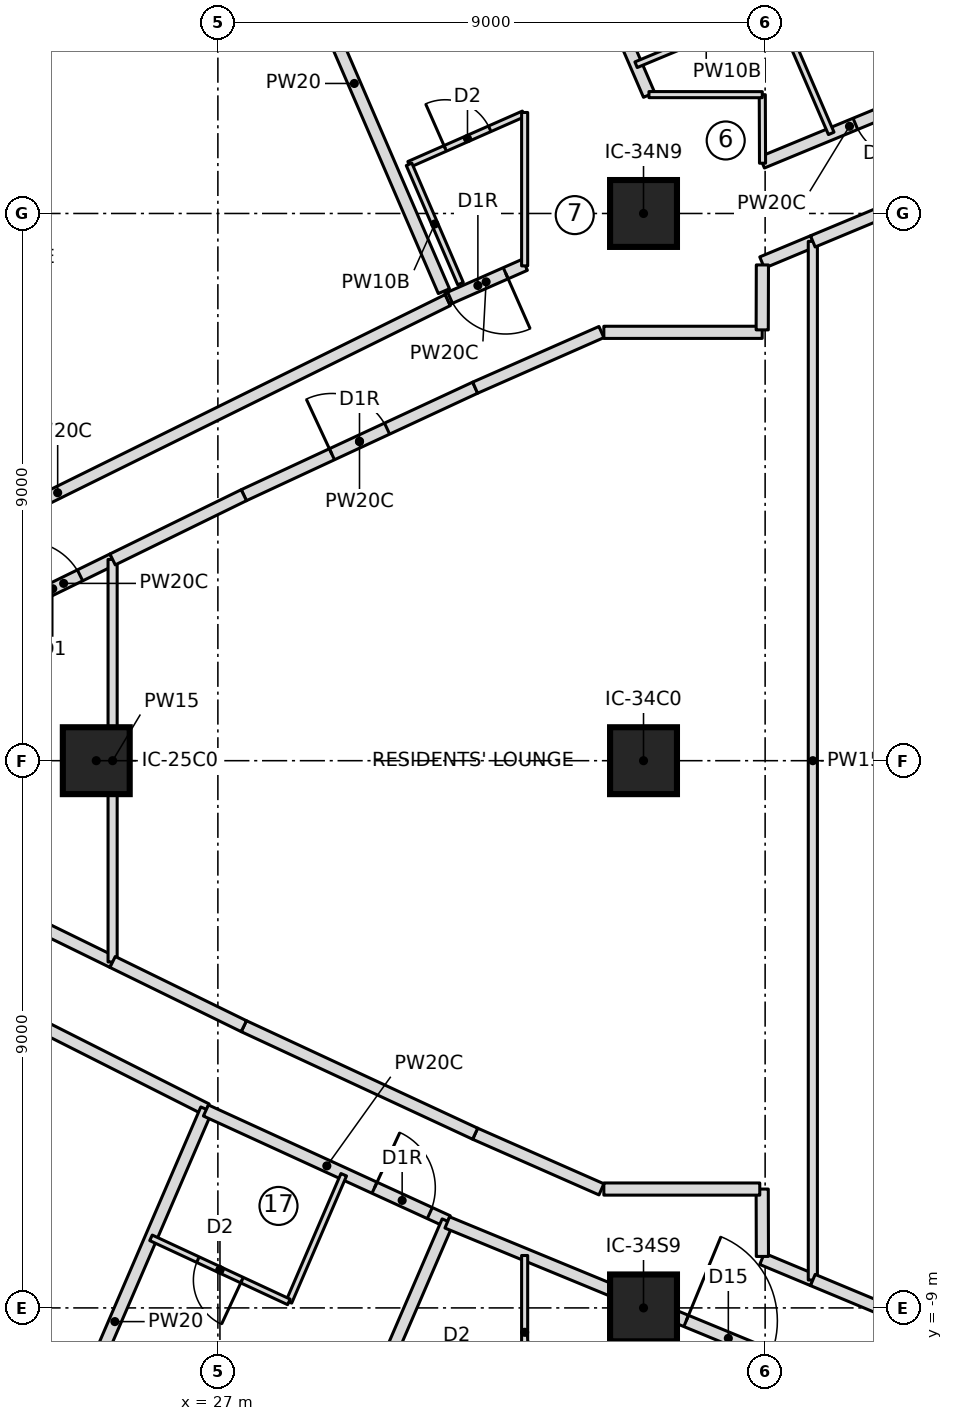
"""IFC4 building model, lengths in metres.
Left out: names, types, materials, properties, quantities, classifications, styles, units other than length and angle.
Written with IfcOpenShell. Run it as: python <this file> out.ifc"""

import sys

from ifc_helpers import new_model, si_unit, direction, frame, frame_2d, origin, origin_2d, place, context, subcontext, project, spatial, rectangle, extrude, element, fill, save


model = new_model("IFC4")
c1 = context("Model", 3, precision=1e-05, world=origin(), true_north=direction((0.0, 1.0)))
c2 = subcontext(c1, "Body", "Model", "MODEL_VIEW")
j1 = project(units=[si_unit("LENGTHUNIT", "METRE"), si_unit("PLANEANGLEUNIT", "RADIAN")], contexts=[c1])
p1 = place(None, origin())
s1 = spatial("IfcSite", under=j1, at=p1, CompositionType="ELEMENT")
p2 = place(p1, origin())
s2 = spatial("IfcBuilding", under=s1, at=p2, CompositionType="ELEMENT")
p3 = place(p2, frame((0.0, 0.0, 133.75)))
s3 = spatial("IfcBuildingStorey", under=s2, at=p3, CompositionType="ELEMENT", Elevation=133.75)
for number, where, z_axis, x_axis in (
    (1, (25.0, 0.0, 0.0), (0.0, 0.0, 1.0), (1.0, 0.0, 0.0)),
    (2, (34.0, -9.0, 0.0), (0.0, 0.0, 1.0), (1.0, 0.0, 0.0)),
    (3, (34.0, 0.0, 0.0), (0.0, 0.0, 1.0), (1.0, 0.0, 0.0)),
    (4, (34.0, 9.0, 0.0), (0.0, 0.0, 1.0), (1.0, 0.0, 0.0)),
):
    element("IfcColumn", number, at=place(p3, frame(where, z_axis=z_axis, x_axis=x_axis)), inside=s3, PredefinedType="COLUMN", context=c2, shape_type="SweptSolid", body=[
        extrude(rectangle(XDim=1.1, YDim=1.1, at=origin_2d()), origin(), (0.0, 0.0, 1.0), 3.55),
    ])
p4 = place(p3, frame((17.95, 1.238, 0.0), z_axis=(0.0, 0.0, 1.0), x_axis=(0.896593504408, 0.44285447706, 0.0)))
e5 = element("IfcWall", 5, at=p4, inside=s3, PredefinedType="PARTITIONING", context=c2, shape_type="SweptSolid", body=[
    extrude(rectangle(XDim=14.31, YDim=0.2, at=frame_2d((7.155, 0.0))), origin(), (0.0, 0.0, 1.0), 3.25),
])
p5 = place(p4, frame((3.05, 0.0, 0.0)))
e6 = element("IfcOpeningElement", 6, at=p5, cuts=e5, PredefinedType="OPENING", context=c2, shape_type="SweptSolid", body=[
    extrude(rectangle(XDim=1.5, YDim=2.1, at=frame_2d((0.75, 1.05))), frame((0.0, 0.11, 0.0), z_axis=(0.0, -1.0, 0.0), x_axis=(1.0, 0.0, 0.0)), (0.0, 0.0, 1.0), 0.22),
])
p6 = place(p3, frame((30.717, 7.722, 0.0), z_axis=(0.0, 0.0, 1.0), x_axis=(-0.395993466394, 0.918253328104, 0.0)))
e7 = element("IfcWall", 7, at=p6, inside=s3, PredefinedType="PARTITIONING", context=c2, shape_type="SweptSolid", body=[
    extrude(rectangle(XDim=7.44, YDim=0.2, at=frame_2d((3.72, 0.0))), origin(), (0.0, 0.0, 1.0), 3.25),
])
p7 = place(p3, frame((32.05, 8.157, 0.0), z_axis=(0.0, 0.0, 1.0), x_axis=(-0.915155082005, -0.403101942293, 0.0)))
e8 = element("IfcWall", 8, at=p7, inside=s3, PredefinedType="PARTITIONING", context=c2, shape_type="SweptSolid", body=[
    extrude(rectangle(XDim=1.396, YDim=0.2, at=frame_2d((0.698, 0.0))), origin(), (0.0, 0.0, 1.0), 3.25),
])
p8 = place(p7, frame((0.346, 0.0, 0.0)))
e9 = element("IfcOpeningElement", 9, at=p8, cuts=e8, PredefinedType="OPENING", context=c2, shape_type="SweptSolid", body=[
    extrude(rectangle(XDim=1.0, YDim=2.1, at=frame_2d((0.5, 1.05))), frame((0.0, 0.11, 0.0), z_axis=(0.0, -1.0, 0.0), x_axis=(1.0, 0.0, 0.0)), (0.0, 0.0, 1.0), 0.22),
])
p9 = place(p3, frame((30.144, 9.809, 0.0), z_axis=(0.0, 0.0, 1.0), x_axis=(0.915122534717, 0.40317582573, 0.0)))
e10 = element("IfcWall", 10, at=p9, inside=s3, PredefinedType="PARTITIONING", context=c2, shape_type="SweptSolid", body=[
    extrude(rectangle(XDim=2.058, YDim=0.1, at=frame_2d((1.029, 0.0))), origin(), (0.0, 0.0, 1.0), 3.25),
])
p10 = place(p9, frame((0.65, 0.0, 0.0)))
e11 = element("IfcOpeningElement", 11, at=p10, cuts=e10, PredefinedType="OPENING", context=c2, shape_type="SweptSolid", body=[
    extrude(rectangle(XDim=0.8, YDim=2.1, at=frame_2d((0.4, 1.05))), frame((0.0, 0.06, 0.0), z_axis=(0.0, -1.0, 0.0), x_axis=(1.0, 0.0, 0.0)), (0.0, 0.0, 1.0), 0.12),
])
p11 = place(p3, frame((30.99, 7.846, 0.0), z_axis=(0.0, 0.0, 1.0), x_axis=(-0.396055229638, 0.918226690462, 0.0)))
e12 = element("IfcWall", 12, at=p11, inside=s3, PredefinedType="PARTITIONING", context=c2, shape_type="SweptSolid", body=[
    extrude(rectangle(XDim=2.137, YDim=0.1, at=frame_2d((1.069, 0.0))), origin(), (0.0, 0.0, 1.0), 3.25),
])
p12 = place(p3, frame((34.092, 10.95, 0.0), z_axis=(0.0, 0.0, 1.0), x_axis=(-0.395991607501, 0.918254129742, 0.0)))
e13 = element("IfcWall", 13, at=p12, inside=s3, PredefinedType="PARTITIONING", context=c2, shape_type="SweptSolid", body=[
    extrude(rectangle(XDim=5.841, YDim=0.2, at=frame_2d((2.92, 0.0))), origin(), (0.0, 0.0, 1.0), 3.25),
])
p13 = place(p3, frame((38.824, 11.028, 0.0), z_axis=(0.0, 0.0, 1.0), x_axis=(-0.924238544028, -0.381815549359, 0.0)))
e14 = element("IfcWall", 14, at=p13, inside=s3, PredefinedType="PARTITIONING", context=c2, shape_type="SweptSolid", body=[
    extrude(rectangle(XDim=3.11, YDim=0.2, at=frame_2d((1.555, 0.0))), origin(), (0.0, 0.0, 1.0), 3.25),
])
p14 = place(p13, frame((0.45, 0.0, 0.0)))
e15 = element("IfcOpeningElement", 15, at=p14, cuts=e14, PredefinedType="OPENING", context=c2, shape_type="SweptSolid", body=[
    extrude(rectangle(XDim=1.0, YDim=2.1, at=frame_2d((0.5, 1.05))), frame((0.0, 0.11, 0.0), z_axis=(0.0, -1.0, 0.0), x_axis=(1.0, 0.0, 0.0)), (0.0, 0.0, 1.0), 0.22),
])
p15 = place(p3, frame((33.877, 11.446, 0.0), z_axis=(0.0, 0.0, 1.0), x_axis=(0.923033583854, 0.384719382248, 0.0)))
e16 = element("IfcWall", 16, at=p15, inside=s3, PredefinedType="PARTITIONING", context=c2, shape_type="SweptSolid", body=[
    extrude(rectangle(XDim=2.5, YDim=0.1, at=frame_2d((1.25, 0.0))), origin(), (0.0, 0.0, 1.0), 3.25),
])
p16 = place(p15, frame((1.15, 0.0, 0.0)))
e17 = element("IfcOpeningElement", 17, at=p16, cuts=e16, PredefinedType="OPENING", context=c2, shape_type="SweptSolid", body=[
    extrude(rectangle(XDim=0.8, YDim=2.1, at=frame_2d((0.4, 1.05))), frame((0.0, 0.06, 0.0), z_axis=(0.0, -1.0, 0.0), x_axis=(1.0, 0.0, 0.0)), (0.0, 0.0, 1.0), 0.12),
])
p17 = place(p3, frame((36.185, 12.408, 0.0), z_axis=(0.0, 0.0, 1.0), x_axis=(0.395936907069, -0.918277717045, 0.0)))
e18 = element("IfcWall", 18, at=p17, inside=s3, PredefinedType="PARTITIONING", context=c2, shape_type="SweptSolid", body=[
    extrude(rectangle(XDim=2.277, YDim=0.1, at=frame_2d((1.139, 0.0))), origin(), (0.0, 0.0, 1.0), 3.25),
])
p18 = place(p3, frame((38.832, 11.009, 0.0), z_axis=(0.0, 0.0, 1.0), x_axis=(-0.395987603644, 0.918255856371, 0.0)))
e19 = element("IfcWall", 19, at=p18, inside=s3, PredefinedType="PARTITIONING", context=c2, shape_type="SweptSolid", body=[
    extrude(rectangle(XDim=7.604, YDim=0.2, at=frame_2d((3.802, 0.0))), origin(), (0.0, 0.0, 1.0), 3.25),
])
p19 = place(p3, frame((17.95, -1.261, 0.0), z_axis=(0.0, 0.0, 1.0), x_axis=(0.892679126003, -0.450692775623, 0.0)))
e20 = element("IfcWall", 20, at=p19, inside=s3, PredefinedType="PARTITIONING", context=c2, shape_type="SweptSolid", body=[
    extrude(rectangle(XDim=9.927, YDim=0.2, at=frame_2d((4.963, 0.0))), origin(), (0.0, 0.0, 1.0), 3.25),
])
p20 = place(p19, frame((3.05, 0.0, 0.0)))
e21 = element("IfcOpeningElement", 21, at=p20, cuts=e20, PredefinedType="OPENING", context=c2, shape_type="SweptSolid", body=[
    extrude(rectangle(XDim=1.5, YDim=2.1, at=frame_2d((0.75, 1.05))), frame((0.0, 0.11, 0.0), z_axis=(0.0, -1.0, 0.0), x_axis=(1.0, 0.0, 0.0)), (0.0, 0.0, 1.0), 0.22),
])
p21 = place(p3, frame((23.801, -12.716, 0.0), z_axis=(0.0, 0.0, 1.0), x_axis=(0.395995556294, 0.918252426839, 0.0)))
e22 = element("IfcWall", 22, at=p21, inside=s3, PredefinedType="PARTITIONING", context=c2, shape_type="SweptSolid", body=[
    extrude(rectangle(XDim=7.603, YDim=0.2, at=frame_2d((3.802, 0.0))), origin(), (0.0, 0.0, 1.0), 3.25),
])
p22 = place(p3, frame((26.803, -5.753, 0.0), z_axis=(0.0, 0.0, 1.0), x_axis=(0.90910092787, -0.416575926987, 0.0)))
e23 = element("IfcWall", 23, at=p22, inside=s3, PredefinedType="PARTITIONING", context=c2, shape_type="SweptSolid", body=[
    extrude(rectangle(XDim=4.375, YDim=0.2, at=frame_2d((2.188, 0.0))), origin(), (0.0, 0.0, 1.0), 3.25),
])
p23 = place(p22, frame((3.05, 0.0, 0.0)))
e24 = element("IfcOpeningElement", 24, at=p23, cuts=e23, PredefinedType="OPENING", context=c2, shape_type="SweptSolid", body=[
    extrude(rectangle(XDim=1.0, YDim=2.1, at=frame_2d((0.5, 1.05))), frame((0.0, 0.11, 0.0), z_axis=(0.0, -1.0, 0.0), x_axis=(1.0, 0.0, 0.0)), (0.0, 0.0, 1.0), 0.22),
])
p24 = place(p3, frame((29.07, -6.81, 0.0), z_axis=(0.0, 0.0, 1.0), x_axis=(-0.396000751487, -0.918250186399, 0.0)))
e25 = element("IfcWall", 25, at=p24, inside=s3, PredefinedType="PARTITIONING", context=c2, shape_type="SweptSolid", body=[
    extrude(rectangle(XDim=2.278, YDim=0.1, at=frame_2d((1.139, 0.0))), origin(), (0.0, 0.0, 1.0), 3.25),
])
p25 = place(p3, frame((28.168, -8.902, 0.0), z_axis=(0.0, 0.0, 1.0), x_axis=(-0.906813113059, 0.421532890751, 0.0)))
e26 = element("IfcWall", 26, at=p25, inside=s3, PredefinedType="PARTITIONING", context=c2, shape_type="SweptSolid", body=[
    extrude(rectangle(XDim=2.501, YDim=0.1, at=frame_2d((1.25, 0.0))), origin(), (0.0, 0.0, 1.0), 3.25),
])
p26 = place(p25, frame((0.85, 0.0, 0.0)))
e27 = element("IfcOpeningElement", 27, at=p26, cuts=e26, PredefinedType="OPENING", context=c2, shape_type="SweptSolid", body=[
    extrude(rectangle(XDim=0.8, YDim=2.1, at=frame_2d((0.4, 1.05))), frame((0.0, 0.06, 0.0), z_axis=(0.0, -1.0, 0.0), x_axis=(1.0, 0.0, 0.0)), (0.0, 0.0, 1.0), 0.12),
])
p27 = place(p3, frame((27.771, -14.554, 0.0), z_axis=(0.0, 0.0, 1.0), x_axis=(0.396004020147, 0.918248776763, 0.0)))
e28 = element("IfcWall", 28, at=p27, inside=s3, PredefinedType="PARTITIONING", context=c2, shape_type="SweptSolid", body=[
    extrude(rectangle(XDim=7.6, YDim=0.2, at=frame_2d((3.8, 0.0))), origin(), (0.0, 0.0, 1.0), 3.25),
])
p28 = place(p3, frame((30.772, -7.594, 0.0), z_axis=(0.0, 0.0, 1.0), x_axis=(0.924461873383, -0.381274500407, 0.0)))
e29 = element("IfcWall", 29, at=p28, inside=s3, PredefinedType="PARTITIONING", context=c2, shape_type="SweptSolid", body=[
    extrude(rectangle(XDim=13.127, YDim=0.2, at=frame_2d((6.564, 0.0))), origin(), (0.0, 0.0, 1.0), 3.25),
])
p29 = place(p28, frame((4.25, 0.0, 0.0)))
e30 = element("IfcOpeningElement", 30, at=p29, cuts=e29, PredefinedType="OPENING", context=c2, shape_type="SweptSolid", body=[
    extrude(rectangle(XDim=1.5, YDim=2.1, at=frame_2d((0.75, 1.05))), frame((0.0, 0.11, 0.0), z_axis=(0.0, -1.0, 0.0), x_axis=(1.0, 0.0, 0.0)), (0.0, 0.0, 1.0), 0.22),
])
p30 = place(p3, frame((23.659, 2.522, 0.0), z_axis=(0.0, 0.0, 1.0), x_axis=(0.898127473276, 0.439735195028, 0.0)))
e31 = element("IfcWall", 31, at=p30, inside=s3, PredefinedType="PARTITIONING", context=c2, shape_type="SweptSolid", body=[
    extrude(rectangle(XDim=1.793, YDim=0.2, at=frame_2d((0.896, 0.0))), origin(), (0.0, 0.0, 1.0), 3.25),
])
p31 = place(p30, frame((0.196, 0.0, 0.0)))
e32 = element("IfcOpeningElement", 32, at=p31, cuts=e31, PredefinedType="OPENING", context=c2, shape_type="SweptSolid", body=[
    extrude(rectangle(XDim=1.0, YDim=2.1, at=frame_2d((0.5, 1.05))), frame((0.0, 0.11, 0.0), z_axis=(0.0, -1.0, 0.0), x_axis=(1.0, 0.0, 0.0)), (0.0, 0.0, 1.0), 0.22),
])
p32 = place(p3, frame((25.269, -3.31, 0.0), z_axis=(0.0, 0.0, 1.0), x_axis=(-0.898127473276, 0.439735195028, 0.0)))
e33 = element("IfcWall", 33, at=p32, inside=s3, PredefinedType="PARTITIONING", context=c2, shape_type="SweptSolid", body=[
    extrude(rectangle(XDim=1.793, YDim=0.2, at=frame_2d((0.896, 0.0))), origin(), (0.0, 0.0, 1.0), 3.25),
])
p33 = place(p3, frame((25.269, -3.31, 0.0), z_axis=(0.0, 0.0, 1.0), x_axis=(0.0, 1.0, 0.0)))
e34 = element("IfcWall", 34, at=p33, inside=s3, PredefinedType="PARTITIONING", context=c2, shape_type="SweptSolid", body=[
    extrude(rectangle(XDim=6.621, YDim=0.15, at=frame_2d((3.31, 0.0))), origin(), (0.0, 0.0, 1.0), 3.25),
])
p34 = place(p3, frame((27.427, 4.367, 0.0), z_axis=(0.0, 0.0, 1.0), x_axis=(0.906830275285, 0.421495968933, 0.0)))
e35 = element("IfcWall", 35, at=p34, inside=s3, PredefinedType="PARTITIONING", context=c2, shape_type="SweptSolid", body=[
    extrude(rectangle(XDim=4.195, YDim=0.2, at=frame_2d((2.098, 0.0))), origin(), (0.0, 0.0, 1.0), 3.25),
])
p35 = place(p34, frame((1.598, 0.0, 0.0)))
e36 = element("IfcOpeningElement", 36, at=p35, cuts=e35, PredefinedType="OPENING", context=c2, shape_type="SweptSolid", body=[
    extrude(rectangle(XDim=1.0, YDim=2.1, at=frame_2d((0.5, 1.05))), frame((0.0, 0.11, 0.0), z_axis=(0.0, -1.0, 0.0), x_axis=(1.0, 0.0, 0.0)), (0.0, 0.0, 1.0), 0.22),
])
p36 = place(p3, frame((31.231, 6.135, 0.0), z_axis=(0.0, 0.0, 1.0), x_axis=(0.915102334452, 0.403221672881, 0.0)))
e37 = element("IfcWall", 37, at=p36, inside=s3, PredefinedType="PARTITIONING", context=c2, shape_type="SweptSolid", body=[
    extrude(rectangle(XDim=2.269, YDim=0.2, at=frame_2d((1.135, 0.0))), origin(), (0.0, 0.0, 1.0), 3.25),
])
for number, where, z_axis, x_axis in (
    (38, (35.95, 8.193, 0.0), (0.0, 0.0, 1.0), (0.923, 0.385, 0.0)),
    (39, (36.784, -8.541, 0.0), (0.0, 0.0, 1.0), (-0.923, 0.385, 0.0)),
):
    element("IfcWall", number, at=place(p3, frame(where, z_axis=z_axis, x_axis=x_axis)), inside=s3, PredefinedType="PARTITIONING", context=c2, shape_type="SweptSolid", body=[
        extrude(rectangle(XDim=0.904, YDim=0.2, at=frame_2d((0.452, 0.0))), origin(), (0.0, 0.0, 1.0), 3.25),
    ])
p37 = place(p3, frame((33.308, -7.05, 0.0), z_axis=(0.0, 0.0, 1.0), x_axis=(-0.915102334452, 0.403221672881, 0.0)))
e40 = element("IfcWall", 40, at=p37, inside=s3, PredefinedType="PARTITIONING", context=c2, shape_type="SweptSolid", body=[
    extrude(rectangle(XDim=2.269, YDim=0.2, at=frame_2d((1.135, 0.0))), origin(), (0.0, 0.0, 1.0), 3.25),
])
p38 = place(p3, frame((31.231, -6.135, 0.0), z_axis=(0.0, 0.0, 1.0), x_axis=(-0.906830275285, 0.421495968933, 0.0)))
e41 = element("IfcWall", 41, at=p38, inside=s3, PredefinedType="PARTITIONING", context=c2, shape_type="SweptSolid", body=[
    extrude(rectangle(XDim=4.195, YDim=0.2, at=frame_2d((2.098, 0.0))), origin(), (0.0, 0.0, 1.0), 3.25),
])
for number, where, z_axis, x_axis in (
    (42, (27.427, -4.367, 0.0), (0.0, 0.0, 1.0), (-0.898, 0.44, 0.0)),
    (43, (25.269, 3.31, 0.0), (0.0, 0.0, 1.0), (0.898, 0.44, 0.0)),
):
    element("IfcWall", number, at=place(p3, frame(where, z_axis=z_axis, x_axis=x_axis)), inside=s3, PredefinedType="PARTITIONING", context=c2, shape_type="SweptSolid", body=[
        extrude(rectangle(XDim=2.403, YDim=0.2, at=frame_2d((1.201, 0.0))), origin(), (0.0, 0.0, 1.0), 3.25),
    ])
p39 = place(p3, frame((36.784, -8.541, 0.0), z_axis=(0.0, 0.0, 1.0), x_axis=(0.0, 1.0, 0.0)))
e44 = element("IfcWall", 44, at=p39, inside=s3, PredefinedType="PARTITIONING", context=c2, shape_type="SweptSolid", body=[
    extrude(rectangle(XDim=17.082, YDim=0.15, at=frame_2d((8.541, 0.0))), origin(), (0.0, 0.0, 1.0), 3.25),
])
for number, where, z_axis, x_axis in (
    (45, (38.943, -9.441, 0.0), (0.0, 0.0, 1.0), (-0.923, 0.385, 0.0)),
    (46, (36.784, 8.541, 0.0), (0.0, 0.0, 1.0), (0.923, 0.385, 0.0)),
):
    element("IfcWall", number, at=place(p3, frame(where, z_axis=z_axis, x_axis=x_axis)), inside=s3, PredefinedType="PARTITIONING", context=c2, shape_type="SweptSolid", body=[
        extrude(rectangle(XDim=2.339, YDim=0.2, at=frame_2d((1.169, 0.0))), origin(), (0.0, 0.0, 1.0), 3.25),
    ])
p40 = place(p3, frame((32.045, 10.661, 0.0), z_axis=(0.0, 0.0, 1.0), x_axis=(0.0, -1.0, 0.0)))
e47 = element("IfcWall", 47, at=p40, inside=s3, PredefinedType="PARTITIONING", context=c2, shape_type="SweptSolid", body=[
    extrude(rectangle(XDim=2.523, YDim=0.1, at=frame_2d((1.261, 0.0))), origin(), (0.0, 0.0, 1.0), 3.25),
])
p41 = place(p3, frame((35.957, 9.827, 0.0), z_axis=(0.0, 0.0, 1.0), x_axis=(-0.003465432949, 0.999993995369, 0.0)))
e48 = element("IfcWall", 48, at=p41, inside=s3, PredefinedType="PARTITIONING", context=c2, shape_type="SweptSolid", body=[
    extrude(rectangle(XDim=1.127, YDim=0.1, at=frame_2d((0.563, 0.0))), origin(), (0.0, 0.0, 1.0), 3.25),
])
p42 = place(p3, frame((35.953, 10.954, 0.0), z_axis=(0.0, 0.0, 1.0), x_axis=(-0.999999785511, 0.000654964491, 0.0)))
e49 = element("IfcWall", 49, at=p42, inside=s3, PredefinedType="PARTITIONING", context=c2, shape_type="SweptSolid", body=[
    extrude(rectangle(XDim=1.864, YDim=0.1, at=frame_2d((0.932, 0.0))), origin(), (0.0, 0.0, 1.0), 3.25),
])
p43 = place(p3, frame((32.045, -8.138, 0.0), z_axis=(0.0, 0.0, 1.0), x_axis=(0.0, -1.0, 0.0)))
e50 = element("IfcWall", 50, at=p43, inside=s3, PredefinedType="PARTITIONING", context=c2, shape_type="SweptSolid", body=[
    extrude(rectangle(XDim=2.526, YDim=0.1, at=frame_2d((1.263, 0.0))), origin(), (0.0, 0.0, 1.0), 3.25),
])
p44 = place(p3, frame((35.955, -8.154, 0.0), z_axis=(0.0, 0.0, 1.0), x_axis=(-0.002643744892, 0.9999965053, 0.0)))
e51 = element("IfcWall", 51, at=p44, inside=s3, PredefinedType="PARTITIONING", context=c2, shape_type="SweptSolid", body=[
    extrude(rectangle(XDim=1.108, YDim=0.2, at=frame_2d((0.554, 0.0))), origin(), (0.0, 0.0, 1.0), 3.25),
])
p45 = place(p3, frame((35.912, -7.045, 0.0), z_axis=(0.0, 0.0, 1.0), x_axis=(-0.999999981873, 0.000190403652, 0.0)))
e52 = element("IfcWall", 52, at=p45, inside=s3, PredefinedType="PARTITIONING", context=c2, shape_type="SweptSolid", body=[
    extrude(rectangle(XDim=2.564, YDim=0.2, at=frame_2d((1.282, 0.0))), origin(), (0.0, 0.0, 1.0), 3.25),
])
p46 = place(p3, frame((33.347, 7.045, 0.0), z_axis=(0.0, 0.0, 1.0), x_axis=(0.999999982426, 0.000187476562, 0.0)))
e53 = element("IfcWall", 53, at=p46, inside=s3, PredefinedType="PARTITIONING", context=c2, shape_type="SweptSolid", body=[
    extrude(rectangle(XDim=2.604, YDim=0.2, at=frame_2d((1.302, 0.0))), origin(), (0.0, 0.0, 1.0), 3.25),
])
p47 = place(p3, frame((35.952, 7.085, 0.0), z_axis=(0.0, 0.0, 1.0), x_axis=(0.002742846825, 0.999996238389, 0.0)))
e54 = element("IfcWall", 54, at=p47, inside=s3, PredefinedType="PARTITIONING", context=c2, shape_type="SweptSolid", body=[
    extrude(rectangle(XDim=1.068, YDim=0.2, at=frame_2d((0.534, 0.0))), origin(), (0.0, 0.0, 1.0), 3.25),
])
p48 = place(p10, origin())
e55 = element("IfcDoor", 55, at=p48, inside=s3, OperationType="SINGLE_SWING_LEFT", PredefinedType="DOOR", context=c2, shape_type="SweptSolid", body=[
    extrude(rectangle(XDim=0.8, YDim=2.1, at=frame_2d((0.4, 1.05))), frame((0.0, 0.025, 0.0), z_axis=(0.0, -1.0, 0.0), x_axis=(1.0, 0.0, 0.0)), (0.0, 0.0, 1.0), 0.05),
])
fill(e11, e55)
p49 = place(p8, origin())
e56 = element("IfcDoor", 56, at=p49, inside=s3, OperationType="SINGLE_SWING_RIGHT", PredefinedType="DOOR", context=c2, shape_type="SweptSolid", body=[
    extrude(rectangle(XDim=1.0, YDim=2.1, at=frame_2d((0.5, 1.05))), frame((0.0, 0.025, 0.0), z_axis=(0.0, -1.0, 0.0), x_axis=(1.0, 0.0, 0.0)), (0.0, 0.0, 1.0), 0.05),
])
fill(e9, e56)
p50 = place(p14, origin())
e57 = element("IfcDoor", 57, at=p50, inside=s3, OperationType="SINGLE_SWING_RIGHT", PredefinedType="DOOR", context=c2, shape_type="SweptSolid", body=[
    extrude(rectangle(XDim=1.0, YDim=2.1, at=frame_2d((0.5, 1.05))), frame((0.0, 0.025, 0.0), z_axis=(0.0, -1.0, 0.0), x_axis=(1.0, 0.0, 0.0)), (0.0, 0.0, 1.0), 0.05),
])
fill(e15, e57)
p51 = place(p26, origin())
e58 = element("IfcDoor", 58, at=p51, inside=s3, OperationType="SINGLE_SWING_LEFT", PredefinedType="DOOR", context=c2, shape_type="SweptSolid", body=[
    extrude(rectangle(XDim=0.8, YDim=2.1, at=frame_2d((0.4, 1.05))), frame((0.0, 0.025, 0.0), z_axis=(0.0, -1.0, 0.0), x_axis=(1.0, 0.0, 0.0)), (0.0, 0.0, 1.0), 0.05),
])
fill(e27, e58)
p52 = place(p23, origin())
e59 = element("IfcDoor", 59, at=p52, inside=s3, OperationType="SINGLE_SWING_RIGHT", PredefinedType="DOOR", context=c2, shape_type="SweptSolid", body=[
    extrude(rectangle(XDim=1.0, YDim=2.1, at=frame_2d((0.5, 1.05))), frame((0.0, 0.025, 0.0), z_axis=(0.0, -1.0, 0.0), x_axis=(1.0, 0.0, 0.0)), (0.0, 0.0, 1.0), 0.05),
])
fill(e24, e59)
p53 = place(p29, origin())
e60 = element("IfcDoor", 60, at=p53, inside=s3, OperationType="DOUBLE_DOOR_SINGLE_SWING", PredefinedType="DOOR", context=c2, shape_type="SweptSolid", body=[
    extrude(rectangle(XDim=1.5, YDim=2.1, at=frame_2d((0.75, 1.05))), frame((0.0, 0.025, 0.0), z_axis=(0.0, -1.0, 0.0), x_axis=(1.0, 0.0, 0.0)), (0.0, 0.0, 1.0), 0.05),
])
fill(e30, e60)
p54 = place(p31, origin())
e61 = element("IfcDoor", 61, at=p54, inside=s3, OperationType="SINGLE_SWING_LEFT", PredefinedType="DOOR", context=c2, shape_type="SweptSolid", body=[
    extrude(rectangle(XDim=1.0, YDim=2.1, at=frame_2d((0.5, 1.05))), frame((0.0, 0.025, 0.0), z_axis=(0.0, -1.0, 0.0), x_axis=(1.0, 0.0, 0.0)), (0.0, 0.0, 1.0), 0.05),
])
fill(e32, e61)
p55 = place(p35, origin())
e62 = element("IfcDoor", 62, at=p55, inside=s3, OperationType="SINGLE_SWING_RIGHT", PredefinedType="DOOR", context=c2, shape_type="SweptSolid", body=[
    extrude(rectangle(XDim=1.0, YDim=2.1, at=frame_2d((0.5, 1.05))), frame((0.0, 0.025, 0.0), z_axis=(0.0, -1.0, 0.0), x_axis=(1.0, 0.0, 0.0)), (0.0, 0.0, 1.0), 0.05),
])
fill(e36, e62)
save(model, sys.argv[1])
